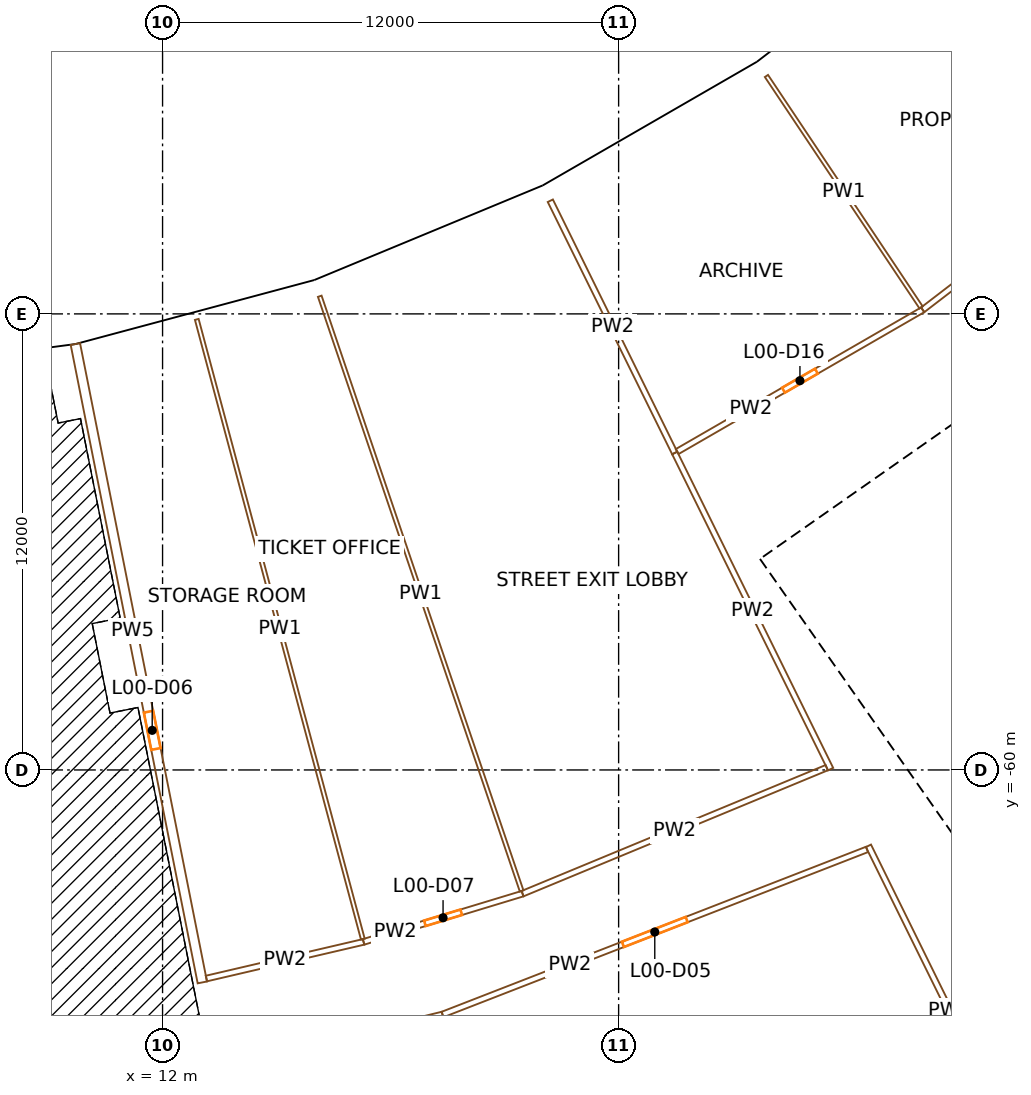
"""IFC4 building model, lengths in metres.
Left out: names, types, materials, properties, quantities, classifications, styles, units other than length and angle.
Written with IfcOpenShell. Run it as: python <this file> out.ifc"""

import sys

from ifc_helpers import new_model, si_unit, direction, frame, frame_2d, origin, origin_2d, place, context, subcontext, project, spatial, rectangle, extrude, element, fill, save


model = new_model("IFC4")
c1 = context("Model", 3, precision=1e-05, world=origin(), true_north=direction((0.0, 1.0)))
c2 = subcontext(c1, "Body", "Model", "MODEL_VIEW")
j1 = project(units=[si_unit("LENGTHUNIT", "METRE"), si_unit("PLANEANGLEUNIT", "RADIAN")], contexts=[c1])
p1 = place(None, origin())
s1 = spatial("IfcSite", under=j1, at=p1, CompositionType="ELEMENT")
p2 = place(p1, origin())
s2 = spatial("IfcBuilding", under=s1, at=p2, CompositionType="ELEMENT")
p3 = place(p2, origin())
s3 = spatial("IfcBuildingStorey", under=s2, at=p3, CompositionType="ELEMENT", Elevation=0.0)
p4 = place(p3, frame((9.901, -49.775, -0.4), z_axis=(0.0, 0.0, 1.0), x_axis=(0.980785280403, 0.195090322016, 0.0)))
e1 = element("IfcColumn", 1, at=p4, inside=s3, PredefinedType="COLUMN", context=c2, shape_type="SweptSolid", body=[
    extrude(rectangle(XDim=1.1, YDim=1.3, at=origin_2d()), origin(), (0.0, 0.0, 1.0), 9.4),
])
p5 = place(p3, frame((11.364, -57.131, -0.4), z_axis=(0.0, 0.0, 1.0), x_axis=(0.980785280403, 0.195090322016, 0.0)))
e2 = element("IfcColumn", 2, at=p5, inside=s3, PredefinedType="COLUMN", context=c2, shape_type="SweptSolid", body=[
    extrude(rectangle(XDim=1.4, YDim=1.8, at=origin_2d()), origin(), (0.0, 0.0, 1.0), 9.4),
])
p6 = place(p3, frame((16.313, -48.057, -0.4), z_axis=(0.0, 0.0, 1.0), x_axis=(0.946930129495, 0.321439465303, 0.0)))
e3 = element("IfcColumn", 3, at=p6, inside=s3, PredefinedType="COLUMN", context=c2, shape_type="SweptSolid", body=[
    extrude(rectangle(XDim=1.1, YDim=1.3, at=origin_2d()), origin(), (0.0, 0.0, 1.0), 9.4),
])
p7 = place(p3, frame((18.724, -55.159, -0.4), z_axis=(0.0, 0.0, 1.0), x_axis=(0.946930129495, 0.321439465303, 0.0)))
e4 = element("IfcColumn", 4, at=p7, inside=s3, PredefinedType="COLUMN", context=c2, shape_type="SweptSolid", body=[
    extrude(rectangle(XDim=1.4, YDim=1.8, at=origin_2d()), origin(), (0.0, 0.0, 1.0), 9.4),
])
p8 = place(p3, frame((22.446, -45.516, -0.4), z_axis=(0.0, 0.0, 1.0), x_axis=(0.896872741533, 0.442288690219, 0.0)))
e5 = element("IfcColumn", 5, at=p8, inside=s3, PredefinedType="COLUMN", context=c2, shape_type="SweptSolid", body=[
    extrude(rectangle(XDim=1.1, YDim=1.3, at=origin_2d()), origin(), (0.0, 0.0, 1.0), 9.4),
])
p9 = place(p3, frame((25.763, -52.243, -0.4), z_axis=(0.0, 0.0, 1.0), x_axis=(0.896872741533, 0.442288690219, 0.0)))
e6 = element("IfcColumn", 6, at=p9, inside=s3, PredefinedType="COLUMN", context=c2, shape_type="SweptSolid", body=[
    extrude(rectangle(XDim=1.4, YDim=1.8, at=origin_2d()), origin(), (0.0, 0.0, 1.0), 9.4),
])
p10 = place(p3, frame((28.195, -42.197, -0.4), z_axis=(0.0, 0.0, 1.0), x_axis=(0.831469612303, 0.55557023302, 0.0)))
e7 = element("IfcColumn", 7, at=p10, inside=s3, PredefinedType="COLUMN", context=c2, shape_type="SweptSolid", body=[
    extrude(rectangle(XDim=1.1, YDim=1.3, at=origin_2d()), origin(), (0.0, 0.0, 1.0), 9.4),
])
p11 = place(p3, frame((32.362, -48.433, -0.4), z_axis=(0.0, 0.0, 1.0), x_axis=(0.831469612303, 0.55557023302, 0.0)))
e8 = element("IfcColumn", 8, at=p11, inside=s3, PredefinedType="COLUMN", context=c2, shape_type="SweptSolid", body=[
    extrude(rectangle(XDim=1.4, YDim=1.8, at=origin_2d()), origin(), (0.0, 0.0, 1.0), 9.4),
])
p12 = place(p3, frame((36.717, -66.337, 0.0), z_axis=(0.0, 0.0, 1.0), x_axis=(-0.573577477574, 0.819151315216, 0.0)))
e9 = element("IfcWall", 9, at=p12, inside=s3, PredefinedType="SHEAR", context=c2, shape_type="SweptSolid", body=[
    extrude(rectangle(XDim=14.8, YDim=0.9, at=frame_2d((7.4, 0.0))), origin(), (0.0, 0.0, 1.0), 8.6),
])
p13 = place(p12, frame((6.2, 0.0, 0.0)))
e10 = element("IfcOpeningElement", 10, at=p13, cuts=e9, PredefinedType="OPENING", context=c2, shape_type="SweptSolid", body=[
    extrude(rectangle(XDim=2.4, YDim=2.1, at=frame_2d((1.2, 1.05))), frame((0.0, 0.46, 0.0), z_axis=(0.0, -1.0, 0.0), x_axis=(1.0, 0.0, 0.0)), (0.0, 0.0, 1.0), 0.92),
])
p14 = place(p3, frame((28.854, -54.324, 0.0), z_axis=(0.0, 0.0, 1.0), x_axis=(0.819145767589, 0.573585400304, 0.0)))
e11 = element("IfcWall", 11, at=p14, inside=s3, PredefinedType="SHEAR", context=c2, shape_type="SweptSolid", body=[
    extrude(rectangle(XDim=15.045, YDim=0.9, at=frame_2d((7.523, 0.0))), origin(), (0.0, 0.0, 1.0), 8.6),
])
p15 = place(p14, frame((0.85, 0.0, 0.0)))
e12 = element("IfcOpeningElement", 12, at=p15, cuts=e11, PredefinedType="OPENING", context=c2, shape_type="SweptSolid", body=[
    extrude(rectangle(XDim=1.0, YDim=2.1, at=frame_2d((0.5, 1.05))), frame((0.0, 0.46, 0.0), z_axis=(0.0, -1.0, 0.0), x_axis=(1.0, 0.0, 0.0)), (0.0, 0.0, 1.0), 0.92),
])
p16 = place(p14, frame((3.575, 0.0, 0.0)))
e13 = element("IfcOpeningElement", 13, at=p16, cuts=e11, PredefinedType="OPENING", context=c2, shape_type="SweptSolid", body=[
    extrude(rectangle(XDim=1.0, YDim=2.1, at=frame_2d((0.5, 1.05))), frame((0.0, 0.46, 0.0), z_axis=(0.0, -1.0, 0.0), x_axis=(1.0, 0.0, 0.0)), (0.0, 0.0, 1.0), 0.92),
])
p17 = place(p14, frame((6.275, 0.0, 0.0)))
e14 = element("IfcOpeningElement", 14, at=p17, cuts=e11, PredefinedType="OPENING", context=c2, shape_type="SweptSolid", body=[
    extrude(rectangle(XDim=0.9, YDim=2.1, at=frame_2d((0.45, 1.05))), frame((0.0, 0.46, 0.0), z_axis=(0.0, -1.0, 0.0), x_axis=(1.0, 0.0, 0.0)), (0.0, 0.0, 1.0), 0.92),
])
p18 = place(p14, frame((13.495, 0.0, 0.0)))
e15 = element("IfcOpeningElement", 15, at=p18, cuts=e11, PredefinedType="OPENING", context=c2, shape_type="SweptSolid", body=[
    extrude(rectangle(XDim=1.1, YDim=2.1, at=frame_2d((0.55, 1.05))), frame((0.0, 0.46, 0.0), z_axis=(0.0, -1.0, 0.0), x_axis=(1.0, 0.0, 0.0)), (0.0, 0.0, 1.0), 0.92),
])
p19 = place(p3, frame((31.895, -58.666, 0.0), z_axis=(0.0, 0.0, 1.0), x_axis=(0.819166993208, 0.573555086491, 0.0)))
e16 = element("IfcWall", 16, at=p19, inside=s3, PredefinedType="SOLIDWALL", context=c2, shape_type="SweptSolid", body=[
    extrude(rectangle(XDim=7.95, YDim=0.3, at=frame_2d((3.975, 0.0))), origin(), (0.0, 0.0, 1.0), 8.6),
])
p20 = place(p19, frame((0.675, 0.0, 0.0)))
e17 = element("IfcOpeningElement", 17, at=p20, cuts=e16, PredefinedType="OPENING", context=c2, shape_type="SweptSolid", body=[
    extrude(rectangle(XDim=1.1, YDim=2.1, at=frame_2d((0.55, 1.05))), frame((0.0, 0.16, 0.0), z_axis=(0.0, -1.0, 0.0), x_axis=(1.0, 0.0, 0.0)), (0.0, 0.0, 1.0), 0.32),
])
p21 = place(p19, frame((3.425, 0.0, 0.0)))
e18 = element("IfcOpeningElement", 18, at=p21, cuts=e16, PredefinedType="OPENING", context=c2, shape_type="SweptSolid", body=[
    extrude(rectangle(XDim=1.1, YDim=2.1, at=frame_2d((0.55, 1.05))), frame((0.0, 0.16, 0.0), z_axis=(0.0, -1.0, 0.0), x_axis=(1.0, 0.0, 0.0)), (0.0, 0.0, 1.0), 0.32),
])
p22 = place(p19, frame((6.175, 0.0, 0.0)))
e19 = element("IfcOpeningElement", 19, at=p22, cuts=e16, PredefinedType="OPENING", context=c2, shape_type="SweptSolid", body=[
    extrude(rectangle(XDim=1.1, YDim=2.1, at=frame_2d((0.55, 1.05))), frame((0.0, 0.16, 0.0), z_axis=(0.0, -1.0, 0.0), x_axis=(1.0, 0.0, 0.0)), (0.0, 0.0, 1.0), 0.32),
])
p23 = place(p3, frame((30.461, -56.618, 0.0), z_axis=(0.0, 0.0, 1.0), x_axis=(0.819142461705, 0.573590121456, 0.0)))
e20 = element("IfcWall", 20, at=p23, inside=s3, PredefinedType="SOLIDWALL", context=c2, shape_type="SweptSolid", body=[
    extrude(rectangle(XDim=7.95, YDim=0.3, at=frame_2d((3.975, 0.0))), origin(), (0.0, 0.0, 1.0), 8.6),
])
p24 = place(p3, frame((33.938, -57.052, 0.0), z_axis=(0.0, 0.0, 1.0), x_axis=(-0.573581496053, 0.819148501424, 0.0)))
e21 = element("IfcWall", 21, at=p24, inside=s3, PredefinedType="SOLIDWALL", context=c2, shape_type="SweptSolid", body=[
    extrude(rectangle(XDim=2.2, YDim=0.3, at=frame_2d((1.1, 0.0))), origin(), (0.0, 0.0, 1.0), 8.6),
])
p25 = place(p3, frame((32.627, -54.917, 0.0), z_axis=(0.0, 0.0, 1.0), x_axis=(-0.573507030513, 0.819200638399, 0.0)))
e22 = element("IfcWall", 22, at=p25, inside=s3, PredefinedType="PARTITIONING", context=c2, shape_type="SweptSolid", body=[
    extrude(rectangle(XDim=2.2, YDim=0.15, at=frame_2d((1.1, 0.0))), origin(), (0.0, 0.0, 1.0), 8.6),
])
p26 = place(p3, frame((22.131, -44.81, 0.0), z_axis=(0.0, 0.0, 1.0), x_axis=(-0.923877418118, -0.382688536921, 0.0)))
e23 = element("IfcWall", 23, at=p26, inside=s3, PredefinedType="SOLIDWALL", context=c2, shape_type="SweptSolid", body=[
    extrude(rectangle(XDim=6.552, YDim=0.45, at=frame_2d((3.276, 0.0))), origin(), (0.0, 0.0, 1.0), 7.7),
])
p27 = place(p26, frame((2.398, 0.0, 0.0)))
e24 = element("IfcOpeningElement", 24, at=p27, cuts=e23, PredefinedType="OPENING", context=c2, shape_type="SweptSolid", body=[
    extrude(rectangle(XDim=1.8, YDim=2.4, at=frame_2d((0.9, 1.2))), frame((0.0, 0.235, 0.0), z_axis=(0.0, -1.0, 0.0), x_axis=(1.0, 0.0, 0.0)), (0.0, 0.0, 1.0), 0.47),
])
p28 = place(p3, frame((27.714, -41.583, 0.0), z_axis=(0.0, 0.0, 1.0), x_axis=(-0.866022817921, -0.50000447882, 0.0)))
e25 = element("IfcWall", 25, at=p28, inside=s3, PredefinedType="SOLIDWALL", context=c2, shape_type="SweptSolid", body=[
    extrude(rectangle(XDim=6.419, YDim=0.45, at=frame_2d((3.21, 0.0))), origin(), (0.0, 0.0, 1.0), 7.7),
])
p29 = place(p3, frame((32.975, -37.555, 0.0), z_axis=(0.0, 0.0, 1.0), x_axis=(-0.793338838284, -0.608780327927, 0.0)))
e26 = element("IfcWall", 26, at=p29, inside=s3, PredefinedType="SOLIDWALL", context=c2, shape_type="SweptSolid", body=[
    extrude(rectangle(XDim=6.597, YDim=0.45, at=frame_2d((3.298, 0.0))), origin(), (0.0, 0.0, 1.0), 7.7),
])
p30 = place(p29, frame((2.398, 0.0, 0.0)))
e27 = element("IfcOpeningElement", 27, at=p30, cuts=e26, PredefinedType="OPENING", context=c2, shape_type="SweptSolid", body=[
    extrude(rectangle(XDim=1.8, YDim=2.4, at=frame_2d((0.9, 1.2))), frame((0.0, 0.235, 0.0), z_axis=(0.0, -1.0, 0.0), x_axis=(1.0, 0.0, 0.0)), (0.0, 0.0, 1.0), 0.47),
])
p31 = place(p3, frame((9.706, -48.794, 0.0), z_axis=(0.0, 0.0, 1.0), x_axis=(0.195085176221, -0.980786303952, 0.0)))
e28 = element("IfcWall", 28, at=p31, inside=s3, PredefinedType="PARTITIONING", context=c2, shape_type="SweptSolid", body=[
    extrude(rectangle(XDim=17.125, YDim=0.25, at=frame_2d((8.562, 0.0))), origin(), (0.0, 0.0, 1.0), 7.6),
])
p32 = place(p31, frame((9.863, 0.0, 0.0)))
e29 = element("IfcOpeningElement", 29, at=p32, cuts=e28, PredefinedType="OPENING", context=c2, shape_type="SweptSolid", body=[
    extrude(rectangle(XDim=1.0, YDim=2.1, at=frame_2d((0.5, 1.05))), frame((0.0, 0.135, 0.0), z_axis=(0.0, -1.0, 0.0), x_axis=(1.0, 0.0, 0.0)), (0.0, 0.0, 1.0), 0.27),
])
p33 = place(p3, frame((12.9, -48.145, 0.0), z_axis=(0.0, 0.0, 1.0), x_axis=(0.258824516405, -0.965924360241, 0.0)))
e30 = element("IfcWall", 30, at=p33, inside=s3, PredefinedType="PARTITIONING", context=c2, shape_type="SweptSolid", body=[
    extrude(rectangle(XDim=16.882, YDim=0.1, at=frame_2d((8.441, 0.0))), origin(), (0.0, 0.0, 1.0), 7.6),
])
p34 = place(p3, frame((13.154, -65.488, 0.0), z_axis=(0.0, 0.0, 1.0), x_axis=(0.973881908434, 0.227055121998, 0.0)))
e31 = element("IfcWall", 31, at=p34, inside=s3, PredefinedType="PARTITIONING", context=c2, shape_type="SweptSolid", body=[
    extrude(rectangle(XDim=4.246, YDim=0.15, at=frame_2d((2.123, 0.0))), origin(), (0.0, 0.0, 1.0), 7.6),
])
p35 = place(p3, frame((13.622, -67.841, 0.0), z_axis=(0.0, 0.0, 1.0), x_axis=(0.971337396257, 0.237704990762, 0.0)))
e32 = element("IfcWall", 32, at=p35, inside=s3, PredefinedType="PARTITIONING", context=c2, shape_type="SweptSolid", body=[
    extrude(rectangle(XDim=5.914, YDim=0.15, at=frame_2d((2.957, 0.0))), origin(), (0.0, 0.0, 1.0), 7.6),
])
p36 = place(p3, frame((16.136, -47.536, 0.0), z_axis=(0.0, 0.0, 1.0), x_axis=(0.321439713462, -0.946930045256, 0.0)))
e33 = element("IfcWall", 33, at=p36, inside=s3, PredefinedType="PARTITIONING", context=c2, shape_type="SweptSolid", body=[
    extrude(rectangle(XDim=16.525, YDim=0.1, at=frame_2d((8.262, 0.0))), origin(), (0.0, 0.0, 1.0), 7.6),
])
p37 = place(p3, frame((17.289, -64.524, 0.0), z_axis=(0.0, 0.0, 1.0), x_axis=(0.956933231095, 0.290308097072, 0.0)))
e34 = element("IfcWall", 34, at=p37, inside=s3, PredefinedType="PARTITIONING", context=c2, shape_type="SweptSolid", body=[
    extrude(rectangle(XDim=4.371, YDim=0.15, at=frame_2d((2.186, 0.0))), origin(), (0.0, 0.0, 1.0), 7.6),
])
p38 = place(p37, frame((1.686, 0.0, 0.0)))
e35 = element("IfcOpeningElement", 35, at=p38, cuts=e34, PredefinedType="OPENING", context=c2, shape_type="SweptSolid", body=[
    extrude(rectangle(XDim=1.0, YDim=2.1, at=frame_2d((0.5, 1.05))), frame((0.0, 0.085, 0.0), z_axis=(0.0, -1.0, 0.0), x_axis=(1.0, 0.0, 0.0)), (0.0, 0.0, 1.0), 0.17),
])
p39 = place(p3, frame((30.536, -62.091, 0.0), z_axis=(0.0, 0.0, 1.0), x_axis=(-0.932006200644, -0.362442329153, 0.0)))
e36 = element("IfcWall", 36, at=p39, inside=s3, PredefinedType="PARTITIONING", context=c2, shape_type="SweptSolid", body=[
    extrude(rectangle(XDim=11.985, YDim=0.15, at=frame_2d((5.993, 0.0))), origin(), (0.0, 0.0, 1.0), 7.6),
])
p40 = place(p39, frame((5.093, 0.0, 0.0)))
e37 = element("IfcOpeningElement", 37, at=p40, cuts=e36, PredefinedType="OPENING", context=c2, shape_type="SweptSolid", body=[
    extrude(rectangle(XDim=1.8, YDim=2.1, at=frame_2d((0.9, 1.05))), frame((0.0, 0.085, 0.0), z_axis=(0.0, -1.0, 0.0), x_axis=(1.0, 0.0, 0.0)), (0.0, 0.0, 1.0), 0.17),
])
p41 = place(p3, frame((21.472, -63.255, 0.0), z_axis=(0.0, 0.0, 1.0), x_axis=(0.923877031545, 0.382689470177, 0.0)))
e38 = element("IfcWall", 38, at=p41, inside=s3, PredefinedType="PARTITIONING", context=c2, shape_type="SweptSolid", body=[
    extrude(rectangle(XDim=8.663, YDim=0.15, at=frame_2d((4.332, 0.0))), origin(), (0.0, 0.0, 1.0), 7.6),
])
p42 = place(p3, frame((22.203, -45.023, 0.0), z_axis=(0.0, 0.0, 1.0), x_axis=(0.442284486457, -0.896874814586, 0.0)))
e39 = element("IfcWall", 39, at=p42, inside=s3, PredefinedType="PARTITIONING", context=c2, shape_type="SweptSolid", body=[
    extrude(rectangle(XDim=7.4, YDim=0.15, at=frame_2d((3.7, 0.0))), origin(), (0.0, 0.0, 1.0), 7.6),
])
p43 = place(p3, frame((25.476, -51.66, 0.0), z_axis=(0.0, 0.0, 1.0), x_axis=(0.442300315355, -0.896867008556, 0.0)))
e40 = element("IfcWall", 40, at=p43, inside=s3, PredefinedType="PARTITIONING", context=c2, shape_type="SweptSolid", body=[
    extrude(rectangle(XDim=9.275, YDim=0.15, at=frame_2d((4.637, 0.0))), origin(), (0.0, 0.0, 1.0), 7.6),
])
p44 = place(p3, frame((25.541, -51.622, 0.0), z_axis=(0.0, 0.0, 1.0), x_axis=(0.866020983744, 0.500007655656, 0.0)))
e41 = element("IfcWall", 41, at=p44, inside=s3, PredefinedType="PARTITIONING", context=c2, shape_type="SweptSolid", body=[
    extrude(rectangle(XDim=7.459, YDim=0.15, at=frame_2d((3.73, 0.0))), origin(), (0.0, 0.0, 1.0), 7.6),
])
p45 = place(p44, frame((3.23, 0.0, 0.0)))
e42 = element("IfcOpeningElement", 42, at=p45, cuts=e41, PredefinedType="OPENING", context=c2, shape_type="SweptSolid", body=[
    extrude(rectangle(XDim=1.0, YDim=2.1, at=frame_2d((0.5, 1.05))), frame((0.0, 0.085, 0.0), z_axis=(0.0, -1.0, 0.0), x_axis=(1.0, 0.0, 0.0)), (0.0, 0.0, 1.0), 0.17),
])
p46 = place(p3, frame((27.89, -41.74, 0.0), z_axis=(0.0, 0.0, 1.0), x_axis=(0.555569023768, -0.831470420297, 0.0)))
e43 = element("IfcWall", 43, at=p46, inside=s3, PredefinedType="PARTITIONING", context=c2, shape_type="SweptSolid", body=[
    extrude(rectangle(XDim=7.325, YDim=0.1, at=frame_2d((3.663, 0.0))), origin(), (0.0, 0.0, 1.0), 7.6),
])
p47 = place(p3, frame((30.573, -61.996, 0.0), z_axis=(0.0, 0.0, 1.0), x_axis=(0.442281083907, -0.89687649251, 0.0)))
e44 = element("IfcWall", 44, at=p47, inside=s3, PredefinedType="PARTITIONING", context=c2, shape_type="SweptSolid", body=[
    extrude(rectangle(XDim=9.675, YDim=0.15, at=frame_2d((4.837, 0.0))), origin(), (0.0, 0.0, 1.0), 7.6),
])
p48 = place(p3, frame((32.001, -47.893, 0.0), z_axis=(0.0, 0.0, 1.0), x_axis=(0.793353438114, 0.608761301523, 0.0)))
e45 = element("IfcWall", 45, at=p48, inside=s3, PredefinedType="PARTITIONING", context=c2, shape_type="SweptSolid", body=[
    extrude(rectangle(XDim=7.459, YDim=0.15, at=frame_2d((3.73, 0.0))), origin(), (0.0, 0.0, 1.0), 7.6),
])
p49 = place(p13, origin())
e46 = element("IfcDoor", 46, at=p49, inside=s3, OperationType="DOUBLE_DOOR_SINGLE_SWING", PredefinedType="DOOR", context=c2, shape_type="SweptSolid", body=[
    extrude(rectangle(XDim=2.4, YDim=2.1, at=frame_2d((1.2, 1.05))), frame((0.0, 0.025, 0.0), z_axis=(0.0, -1.0, 0.0), x_axis=(1.0, 0.0, 0.0)), (0.0, 0.0, 1.0), 0.05),
])
fill(e10, e46)
p50 = place(p20, origin())
e47 = element("IfcDoor", 47, at=p50, inside=s3, OperationType="DOUBLE_DOOR_SLIDING", PredefinedType="DOOR", context=c2, shape_type="SweptSolid", body=[
    extrude(rectangle(XDim=1.1, YDim=2.1, at=frame_2d((0.55, 1.05))), frame((0.0, 0.025, 0.0), z_axis=(0.0, -1.0, 0.0), x_axis=(1.0, 0.0, 0.0)), (0.0, 0.0, 1.0), 0.05),
])
fill(e17, e47)
p51 = place(p15, origin())
e48 = element("IfcDoor", 48, at=p51, inside=s3, OperationType="SINGLE_SWING_LEFT", PredefinedType="DOOR", context=c2, shape_type="SweptSolid", body=[
    extrude(rectangle(XDim=1.0, YDim=2.1, at=frame_2d((0.5, 1.05))), frame((0.0, 0.025, 0.0), z_axis=(0.0, -1.0, 0.0), x_axis=(1.0, 0.0, 0.0)), (0.0, 0.0, 1.0), 0.05),
])
fill(e12, e48)
p52 = place(p16, origin())
e49 = element("IfcDoor", 49, at=p52, inside=s3, OperationType="SINGLE_SWING_RIGHT", PredefinedType="DOOR", context=c2, shape_type="SweptSolid", body=[
    extrude(rectangle(XDim=1.0, YDim=2.1, at=frame_2d((0.5, 1.05))), frame((0.0, 0.025, 0.0), z_axis=(0.0, -1.0, 0.0), x_axis=(1.0, 0.0, 0.0)), (0.0, 0.0, 1.0), 0.05),
])
fill(e13, e49)
p53 = place(p27, origin())
e50 = element("IfcDoor", 50, at=p53, inside=s3, OperationType="DOUBLE_DOOR_DOUBLE_SWING", PredefinedType="DOOR", context=c2, shape_type="SweptSolid", body=[
    extrude(rectangle(XDim=1.8, YDim=2.4, at=frame_2d((0.9, 1.2))), frame((0.0, 0.025, 0.0), z_axis=(0.0, -1.0, 0.0), x_axis=(1.0, 0.0, 0.0)), (0.0, 0.0, 1.0), 0.05),
])
fill(e24, e50)
p54 = place(p40, origin())
e51 = element("IfcDoor", 51, at=p54, inside=s3, OperationType="DOUBLE_DOOR_SINGLE_SWING", PredefinedType="DOOR", context=c2, shape_type="SweptSolid", body=[
    extrude(rectangle(XDim=1.8, YDim=2.1, at=frame_2d((0.9, 1.05))), frame((0.0, 0.025, 0.0), z_axis=(0.0, -1.0, 0.0), x_axis=(1.0, 0.0, 0.0)), (0.0, 0.0, 1.0), 0.05),
])
fill(e37, e51)
p55 = place(p32, origin())
e52 = element("IfcDoor", 52, at=p55, inside=s3, OperationType="SINGLE_SWING_RIGHT", PredefinedType="DOOR", context=c2, shape_type="SweptSolid", body=[
    extrude(rectangle(XDim=1.0, YDim=2.1, at=frame_2d((0.5, 1.05))), frame((0.0, 0.025, 0.0), z_axis=(0.0, -1.0, 0.0), x_axis=(1.0, 0.0, 0.0)), (0.0, 0.0, 1.0), 0.05),
])
fill(e29, e52)
p56 = place(p38, origin())
e53 = element("IfcDoor", 53, at=p56, inside=s3, OperationType="SINGLE_SWING_RIGHT", PredefinedType="DOOR", context=c2, shape_type="SweptSolid", body=[
    extrude(rectangle(XDim=1.0, YDim=2.1, at=frame_2d((0.5, 1.05))), frame((0.0, 0.025, 0.0), z_axis=(0.0, -1.0, 0.0), x_axis=(1.0, 0.0, 0.0)), (0.0, 0.0, 1.0), 0.05),
])
fill(e35, e53)
p57 = place(p45, origin())
e54 = element("IfcDoor", 54, at=p57, inside=s3, OperationType="SINGLE_SWING_RIGHT", PredefinedType="DOOR", context=c2, shape_type="SweptSolid", body=[
    extrude(rectangle(XDim=1.0, YDim=2.1, at=frame_2d((0.5, 1.05))), frame((0.0, 0.025, 0.0), z_axis=(0.0, -1.0, 0.0), x_axis=(1.0, 0.0, 0.0)), (0.0, 0.0, 1.0), 0.05),
])
fill(e42, e54)
save(model, sys.argv[1])
